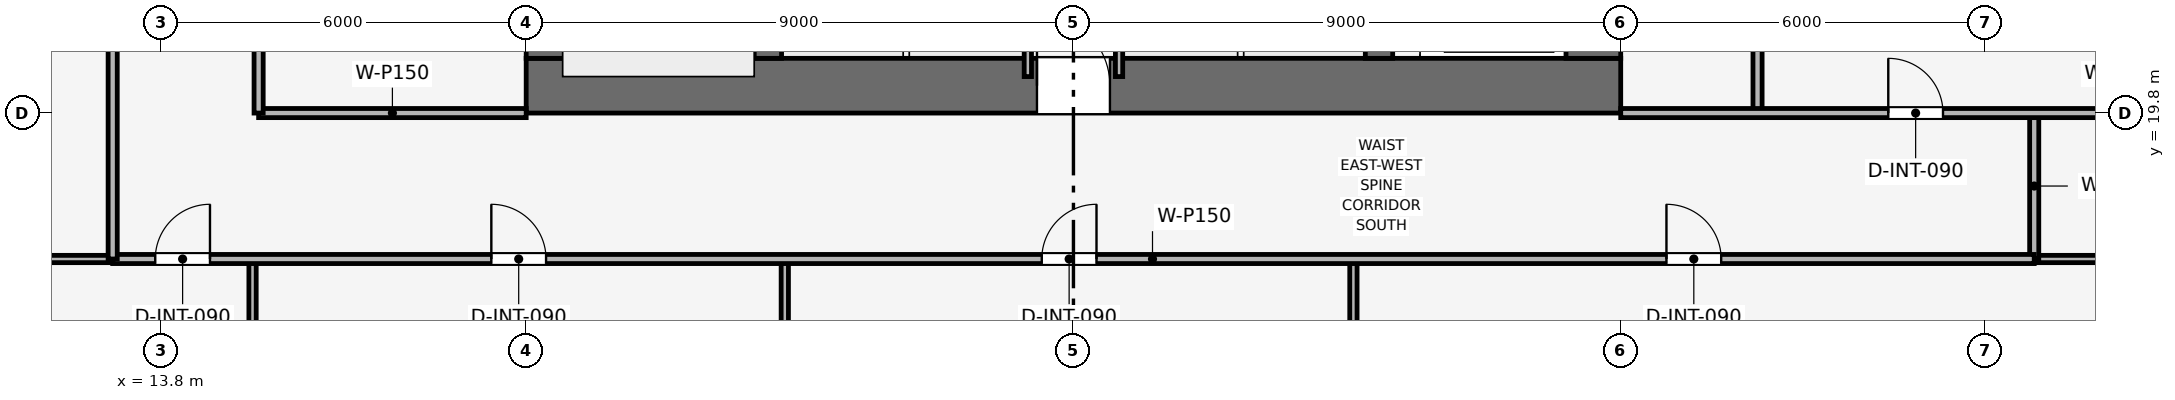
"""IFC4 building model, lengths in metres.
Left out: names, types, materials, properties, quantities, classifications, styles, units other than length and angle.
Written with IfcOpenShell. Run it as: python <this file> out.ifc"""

import sys

from ifc_helpers import new_model, si_unit, direction, frame, frame_2d, origin, place, context, subcontext, project, spatial, rectangle, extrude, element, fill, save


model = new_model("IFC4")
c1 = context("Model", 3, precision=1e-05, world=origin(), true_north=direction((0.0, 1.0)))
c2 = subcontext(c1, "Body", "Model", "MODEL_VIEW")
j1 = project(units=[si_unit("LENGTHUNIT", "METRE"), si_unit("PLANEANGLEUNIT", "RADIAN")], contexts=[c1])
p1 = place(None, origin())
s1 = spatial("IfcSite", under=j1, at=p1, CompositionType="ELEMENT")
p2 = place(p1, origin())
s2 = spatial("IfcBuilding", under=s1, at=p2, CompositionType="ELEMENT")
p3 = place(p2, frame((0.0, 0.0, 149.55)))
s3 = spatial("IfcBuildingStorey", under=s2, at=p3, CompositionType="ELEMENT", Elevation=149.55)
p4 = place(p3, frame((19.8, 20.25, 0.0), z_axis=(0.0, 0.0, 1.0), x_axis=(1.0, 0.0, 0.0)))
e1 = element("IfcWall", 1, at=p4, inside=s3, PredefinedType="SHEAR", context=c2, shape_type="SweptSolid", body=[
    extrude(rectangle(XDim=18.0, YDim=0.9, at=frame_2d((9.0, 0.0))), origin(), (0.0, 0.0, 1.0), 3.75),
])
p5 = place(p4, frame((8.4, 0.0, 0.0)))
e2 = element("IfcOpeningElement", 2, at=p5, cuts=e1, PredefinedType="OPENING", context=c2, shape_type="SweptSolid", body=[
    extrude(rectangle(XDim=1.2, YDim=2.2, at=frame_2d((0.6, 1.1))), frame((0.0, 0.46, 0.0), z_axis=(0.0, -1.0, 0.0), x_axis=(1.0, 0.0, 0.0)), (0.0, 0.0, 1.0), 0.92),
])
p6 = place(p3, frame((20.25, 20.7, 0.0), z_axis=(0.0, 0.0, 1.0), x_axis=(0.0, 1.0, 0.0)))
e3 = element("IfcWall", 3, at=p6, inside=s3, PredefinedType="SHEAR", context=c2, shape_type="SweptSolid", body=[
    extrude(rectangle(XDim=16.2, YDim=0.9, at=frame_2d((8.1, 0.0))), origin(), (0.0, 0.0, 1.0), 3.75),
])
p7 = place(p6, frame((10.1, 0.0, 0.0)))
e4 = element("IfcOpeningElement", 4, at=p7, cuts=e3, PredefinedType="OPENING", context=c2, shape_type="SweptSolid", body=[
    extrude(rectangle(XDim=1.1, YDim=2.15, at=frame_2d((0.55, 1.075))), frame((0.0, 0.46, 0.0), z_axis=(0.0, -1.0, 0.0), x_axis=(1.0, 0.0, 0.0)), (0.0, 0.0, 1.0), 0.92),
])
p8 = place(p3, frame((37.35, 20.7, 0.0), z_axis=(0.0, 0.0, 1.0), x_axis=(0.0, 1.0, 0.0)))
e5 = element("IfcWall", 5, at=p8, inside=s3, PredefinedType="SHEAR", context=c2, shape_type="SweptSolid", body=[
    extrude(rectangle(XDim=16.2, YDim=0.9, at=frame_2d((8.1, 0.0))), origin(), (0.0, 0.0, 1.0), 3.75),
])
p9 = place(p8, frame((4.6, 0.0, 0.0)))
e6 = element("IfcOpeningElement", 6, at=p9, cuts=e5, PredefinedType="OPENING", context=c2, shape_type="SweptSolid", body=[
    extrude(rectangle(XDim=1.1, YDim=2.15, at=frame_2d((0.55, 1.075))), frame((0.0, 0.46, 0.0), z_axis=(0.0, -1.0, 0.0), x_axis=(1.0, 0.0, 0.0)), (0.0, 0.0, 1.0), 0.92),
])
for number, where, z_axis, x_axis in (
    (7, (23.775, 20.7, 0.0), (0.0, 0.0, 1.0), (0.0, 1.0, 0.0)),
    (8, (33.825, 20.7, 0.0), (0.0, 0.0, 1.0), (0.0, 1.0, 0.0)),
):
    element("IfcWall", number, at=place(p3, frame(where, z_axis=z_axis, x_axis=x_axis)), inside=s3, PredefinedType="SHEAR", context=c2, shape_type="SweptSolid", body=[
        extrude(rectangle(XDim=16.2, YDim=0.45, at=frame_2d((8.1, 0.0))), origin(), (0.0, 0.0, 1.0), 3.75),
    ])
for number, where, z_axis, x_axis in (
    (9, (28.05, 20.4, 0.0), (0.0, 0.0, 1.0), (0.0, 1.0, 0.0)),
    (10, (29.55, 20.4, 0.0), (0.0, 0.0, 1.0), (0.0, 1.0, 0.0)),
):
    element("IfcWall", number, at=place(p3, frame(where, z_axis=z_axis, x_axis=x_axis)), inside=s3, PredefinedType="PARTITIONING", context=c2, shape_type="SweptSolid", body=[
        extrude(rectangle(XDim=2.75, YDim=0.12, at=frame_2d((1.375, 0.0))), origin(), (0.0, 0.0, 1.0), 3.495),
    ])
p10 = place(p3, frame((15.4, 19.8, 0.0), z_axis=(0.0, 0.0, 1.0), x_axis=(1.0, 0.0, 0.0)))
e11 = element("IfcWall", 11, at=p10, inside=s3, PredefinedType="PARTITIONING", context=c2, shape_type="SweptSolid", body=[
    extrude(rectangle(XDim=4.4, YDim=0.15, at=frame_2d((2.2, 0.0))), origin(), (0.0, 0.0, 1.0), 3.03),
])
p11 = place(p3, frame((15.4, 19.8, 0.0), z_axis=(0.0, 0.0, 1.0), x_axis=(0.0, 1.0, 0.0)))
e12 = element("IfcWall", 12, at=p11, inside=s3, PredefinedType="PARTITIONING", context=c2, shape_type="SweptSolid", body=[
    extrude(rectangle(XDim=10.35, YDim=0.15, at=frame_2d((5.175, 0.0))), origin(), (0.0, 0.0, 1.0), 3.03),
])
p12 = place(p11, frame((1.2, 0.0, 0.0)))
e13 = element("IfcOpeningElement", 13, at=p12, cuts=e12, PredefinedType="OPENING", context=c2, shape_type="SweptSolid", body=[
    extrude(rectangle(XDim=0.9, YDim=2.1, at=frame_2d((0.45, 1.05))), frame((0.0, 0.085, 0.0), z_axis=(0.0, -1.0, 0.0), x_axis=(1.0, 0.0, 0.0)), (0.0, 0.0, 1.0), 0.17),
])
p13 = place(p11, frame((4.7, 0.0, 0.0)))
e14 = element("IfcOpeningElement", 14, at=p13, cuts=e12, PredefinedType="OPENING", context=c2, shape_type="SweptSolid", body=[
    extrude(rectangle(XDim=0.9, YDim=2.1, at=frame_2d((0.45, 1.05))), frame((0.0, 0.085, 0.0), z_axis=(0.0, -1.0, 0.0), x_axis=(1.0, 0.0, 0.0)), (0.0, 0.0, 1.0), 0.17),
])
p14 = place(p11, frame((8.1, 0.0, 0.0)))
e15 = element("IfcOpeningElement", 15, at=p14, cuts=e12, PredefinedType="OPENING", context=c2, shape_type="SweptSolid", body=[
    extrude(rectangle(XDim=0.95, YDim=2.1, at=frame_2d((0.475, 1.05))), frame((0.0, 0.085, 0.0), z_axis=(0.0, -1.0, 0.0), x_axis=(1.0, 0.0, 0.0)), (0.0, 0.0, 1.0), 0.17),
])
p15 = place(p3, frame((40.05, 19.8, 0.0), z_axis=(0.0, 0.0, 1.0), x_axis=(0.0, 1.0, 0.0)))
e16 = element("IfcWall", 16, at=p15, inside=s3, PredefinedType="PARTITIONING", context=c2, shape_type="SweptSolid", body=[
    extrude(rectangle(XDim=7.05, YDim=0.15, at=frame_2d((3.525, 0.0))), origin(), (0.0, 0.0, 1.0), 3.03),
])
for number, where, z_axis, x_axis in (
    (17, (15.3, 4.63, 0.0), (0.0, 0.0, 1.0), (0.0, 1.0, 0.0)),
    (18, (24.053, 4.63, 0.0), (0.0, 0.0, 1.0), (0.0, 1.0, 0.0)),
    (19, (33.404, 4.63, 0.0), (0.0, 0.0, 1.0), (0.0, 1.0, 0.0)),
):
    element("IfcWall", number, at=place(p3, frame(where, z_axis=z_axis, x_axis=x_axis)), inside=s3, PredefinedType="PARTITIONING", context=c2, shape_type="SweptSolid", body=[
        extrude(rectangle(XDim=12.77, YDim=0.12, at=frame_2d((6.385, 0.0))), origin(), (0.0, 0.0, 1.0), 2.98),
    ])
p16 = place(p3, frame((4.63, 17.4, 0.0), z_axis=(0.0, 0.0, 1.0), x_axis=(1.0, 0.0, 0.0)))
e20 = element("IfcWall", 20, at=p16, inside=s3, PredefinedType="PARTITIONING", context=c2, shape_type="SweptSolid", body=[
    extrude(rectangle(XDim=8.37, YDim=0.12, at=frame_2d((4.185, 0.0))), origin(), (0.0, 0.0, 1.0), 2.98),
])
p17 = place(p3, frame((44.6, 17.4, 0.0), z_axis=(0.0, 0.0, 1.0), x_axis=(1.0, 0.0, 0.0)))
e21 = element("IfcWall", 21, at=p17, inside=s3, PredefinedType="PARTITIONING", context=c2, shape_type="SweptSolid", body=[
    extrude(rectangle(XDim=8.37, YDim=0.12, at=frame_2d((4.185, 0.0))), origin(), (0.0, 0.0, 1.0), 2.98),
])
p18 = place(p3, frame((44.6, 17.4, 0.0), z_axis=(0.0, 0.0, 1.0), x_axis=(0.0, 1.0, 0.0)))
e22 = element("IfcWall", 22, at=p18, inside=s3, PredefinedType="PARTITIONING", context=c2, shape_type="SweptSolid", body=[
    extrude(rectangle(XDim=2.4, YDim=0.15, at=frame_2d((1.2, 0.0))), origin(), (0.0, 0.0, 1.0), 3.495),
])
p19 = place(p3, frame((37.8, 19.8, 0.0), z_axis=(0.0, 0.0, 1.0), x_axis=(1.0, 0.0, 0.0)))
e23 = element("IfcWall", 23, at=p19, inside=s3, PredefinedType="PARTITIONING", context=c2, shape_type="SweptSolid", body=[
    extrude(rectangle(XDim=15.17, YDim=0.15, at=frame_2d((7.585, 0.0))), origin(), (0.0, 0.0, 1.0), 2.98),
])
p20 = place(p19, frame((4.4, 0.0, 0.0)))
e24 = element("IfcOpeningElement", 24, at=p20, cuts=e23, PredefinedType="OPENING", context=c2, shape_type="SweptSolid", body=[
    extrude(rectangle(XDim=0.9, YDim=2.1, at=frame_2d((0.45, 1.05))), frame((0.0, 0.085, 0.0), z_axis=(0.0, -1.0, 0.0), x_axis=(1.0, 0.0, 0.0)), (0.0, 0.0, 1.0), 0.17),
])
p21 = place(p3, frame((13.0, 17.4, 0.0), z_axis=(0.0, 0.0, 1.0), x_axis=(1.0, 0.0, 0.0)))
e25 = element("IfcWall", 25, at=p21, inside=s3, PredefinedType="PARTITIONING", context=c2, shape_type="SweptSolid", body=[
    extrude(rectangle(XDim=31.6, YDim=0.15, at=frame_2d((15.8, 0.0))), origin(), (0.0, 0.0, 1.0), 3.03),
])
p22 = place(p21, frame((0.7, 0.0, 0.0)))
e26 = element("IfcOpeningElement", 26, at=p22, cuts=e25, PredefinedType="OPENING", context=c2, shape_type="SweptSolid", body=[
    extrude(rectangle(XDim=0.9, YDim=2.1, at=frame_2d((0.45, 1.05))), frame((0.0, 0.085, 0.0), z_axis=(0.0, -1.0, 0.0), x_axis=(1.0, 0.0, 0.0)), (0.0, 0.0, 1.0), 0.17),
])
p23 = place(p21, frame((6.227, 0.0, 0.0)))
e27 = element("IfcOpeningElement", 27, at=p23, cuts=e25, PredefinedType="OPENING", context=c2, shape_type="SweptSolid", body=[
    extrude(rectangle(XDim=0.9, YDim=2.1, at=frame_2d((0.45, 1.05))), frame((0.0, 0.085, 0.0), z_axis=(0.0, -1.0, 0.0), x_axis=(1.0, 0.0, 0.0)), (0.0, 0.0, 1.0), 0.17),
])
p24 = place(p21, frame((15.279, 0.0, 0.0)))
e28 = element("IfcOpeningElement", 28, at=p24, cuts=e25, PredefinedType="OPENING", context=c2, shape_type="SweptSolid", body=[
    extrude(rectangle(XDim=0.9, YDim=2.1, at=frame_2d((0.45, 1.05))), frame((0.0, 0.085, 0.0), z_axis=(0.0, -1.0, 0.0), x_axis=(1.0, 0.0, 0.0)), (0.0, 0.0, 1.0), 0.17),
])
p25 = place(p21, frame((25.552, 0.0, 0.0)))
e29 = element("IfcOpeningElement", 29, at=p25, cuts=e25, PredefinedType="OPENING", context=c2, shape_type="SweptSolid", body=[
    extrude(rectangle(XDim=0.9, YDim=2.1, at=frame_2d((0.45, 1.05))), frame((0.0, 0.085, 0.0), z_axis=(0.0, -1.0, 0.0), x_axis=(1.0, 0.0, 0.0)), (0.0, 0.0, 1.0), 0.17),
])
p26 = place(p3, frame((13.0, 17.4, 0.0), z_axis=(0.0, 0.0, 1.0), x_axis=(0.0, 1.0, 0.0)))
e30 = element("IfcWall", 30, at=p26, inside=s3, PredefinedType="PARTITIONING", context=c2, shape_type="SweptSolid", body=[
    extrude(rectangle(XDim=22.8, YDim=0.15, at=frame_2d((11.4, 0.0))), origin(), (0.0, 0.0, 1.0), 3.03),
])
p27 = place(p26, frame((10.95, 0.0, 0.0)))
e31 = element("IfcOpeningElement", 31, at=p27, cuts=e30, PredefinedType="OPENING", context=c2, shape_type="SweptSolid", body=[
    extrude(rectangle(XDim=0.9, YDim=2.1, at=frame_2d((0.45, 1.05))), frame((0.0, 0.085, 0.0), z_axis=(0.0, -1.0, 0.0), x_axis=(1.0, 0.0, 0.0)), (0.0, 0.0, 1.0), 0.17),
])
p28 = place(p20, origin())
e32 = element("IfcDoor", 32, at=p28, inside=s3, OperationType="SINGLE_SWING_LEFT", PredefinedType="DOOR", context=c2, shape_type="SweptSolid", body=[
    extrude(rectangle(XDim=0.9, YDim=2.1, at=frame_2d((0.45, 1.05))), frame((0.0, 0.025, 0.0), z_axis=(0.0, -1.0, 0.0), x_axis=(1.0, 0.0, 0.0)), (0.0, 0.0, 1.0), 0.05),
])
fill(e24, e32)
p29 = place(p22, origin())
e33 = element("IfcDoor", 33, at=p29, inside=s3, OperationType="SINGLE_SWING_RIGHT", PredefinedType="DOOR", context=c2, shape_type="SweptSolid", body=[
    extrude(rectangle(XDim=0.9, YDim=2.1, at=frame_2d((0.45, 1.05))), frame((0.0, 0.025, 0.0), z_axis=(0.0, -1.0, 0.0), x_axis=(1.0, 0.0, 0.0)), (0.0, 0.0, 1.0), 0.05),
])
fill(e26, e33)
p30 = place(p23, origin())
e34 = element("IfcDoor", 34, at=p30, inside=s3, OperationType="SINGLE_SWING_LEFT", PredefinedType="DOOR", context=c2, shape_type="SweptSolid", body=[
    extrude(rectangle(XDim=0.9, YDim=2.1, at=frame_2d((0.45, 1.05))), frame((0.0, 0.025, 0.0), z_axis=(0.0, -1.0, 0.0), x_axis=(1.0, 0.0, 0.0)), (0.0, 0.0, 1.0), 0.05),
])
fill(e27, e34)
p31 = place(p24, origin())
e35 = element("IfcDoor", 35, at=p31, inside=s3, OperationType="SINGLE_SWING_RIGHT", PredefinedType="DOOR", context=c2, shape_type="SweptSolid", body=[
    extrude(rectangle(XDim=0.9, YDim=2.1, at=frame_2d((0.45, 1.05))), frame((0.0, 0.025, 0.0), z_axis=(0.0, -1.0, 0.0), x_axis=(1.0, 0.0, 0.0)), (0.0, 0.0, 1.0), 0.05),
])
fill(e28, e35)
p32 = place(p25, origin())
e36 = element("IfcDoor", 36, at=p32, inside=s3, OperationType="SINGLE_SWING_LEFT", PredefinedType="DOOR", context=c2, shape_type="SweptSolid", body=[
    extrude(rectangle(XDim=0.9, YDim=2.1, at=frame_2d((0.45, 1.05))), frame((0.0, 0.025, 0.0), z_axis=(0.0, -1.0, 0.0), x_axis=(1.0, 0.0, 0.0)), (0.0, 0.0, 1.0), 0.05),
])
fill(e29, e36)
p33 = place(p5, origin())
e37 = element("IfcDoor", 37, at=p33, inside=s3, OperationType="SINGLE_SWING_LEFT", PredefinedType="DOOR", context=c2, shape_type="SweptSolid", body=[
    extrude(rectangle(XDim=1.2, YDim=2.2, at=frame_2d((0.6, 1.1))), frame((0.0, 0.025, 0.0), z_axis=(0.0, -1.0, 0.0), x_axis=(1.0, 0.0, 0.0)), (0.0, 0.0, 1.0), 0.05),
])
fill(e2, e37)
save(model, sys.argv[1])
